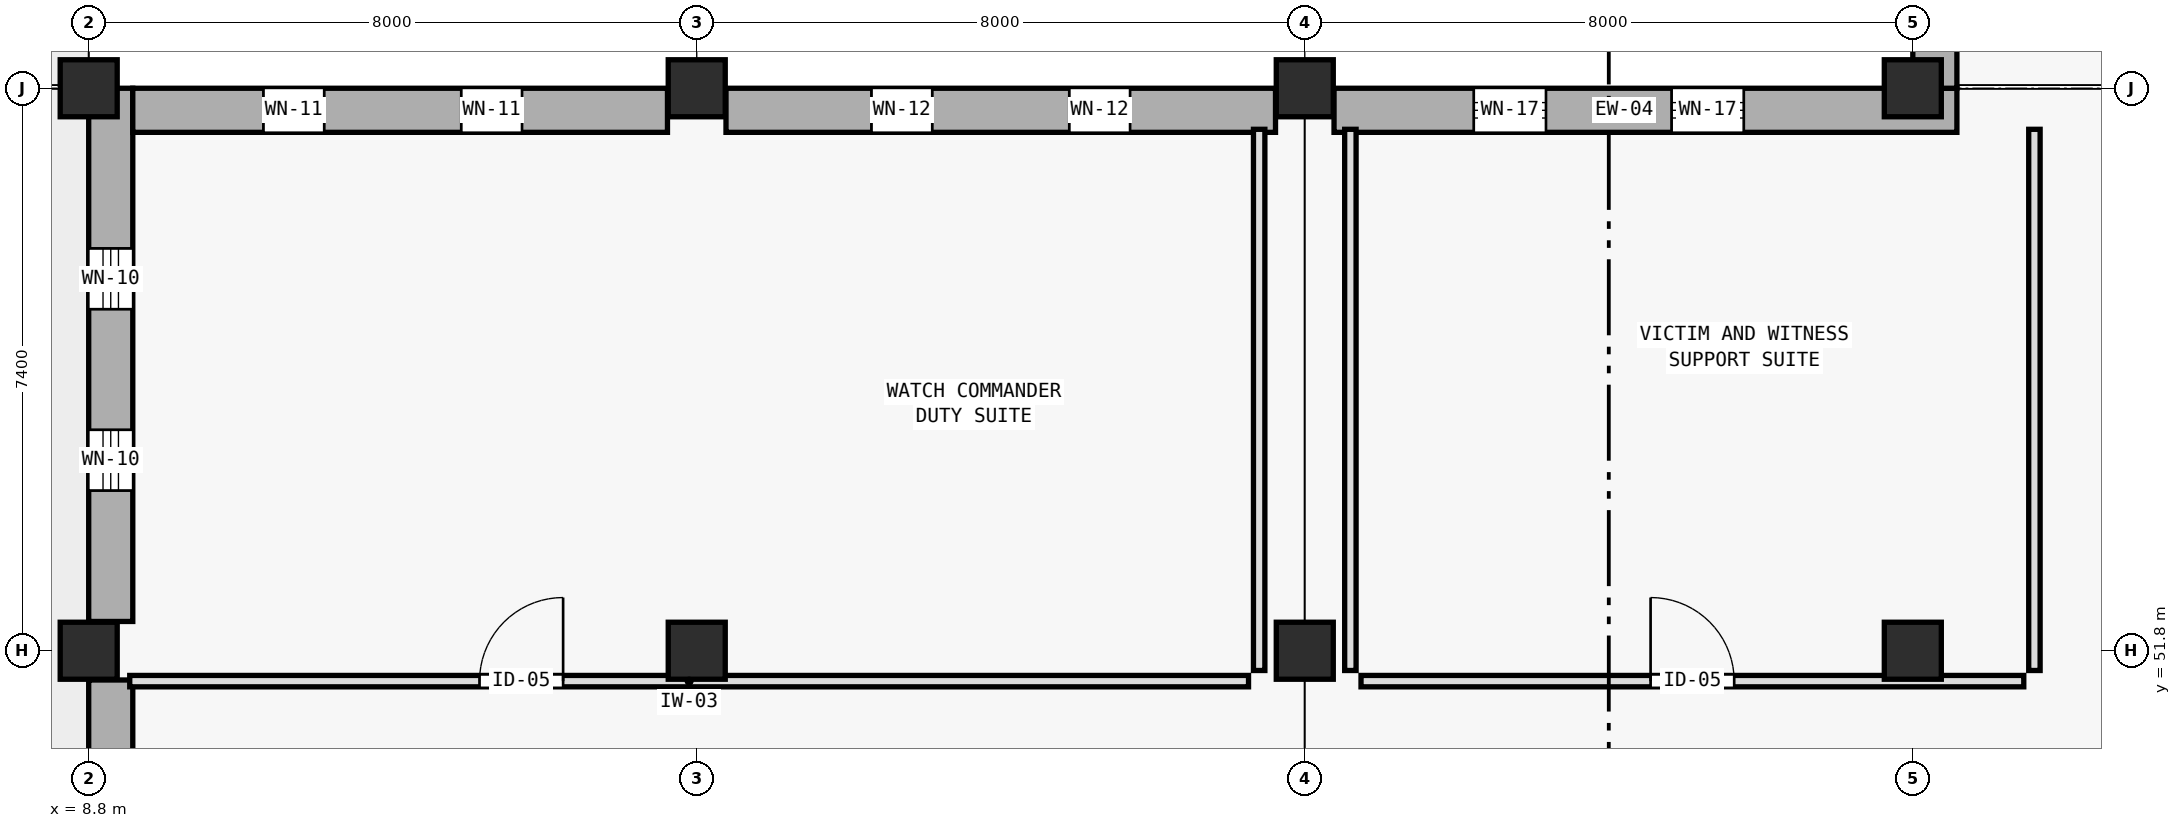
"""IFC4 building model, lengths in metres.
Left out: names, types, materials, properties, quantities, classifications, styles, units other than length and angle.
Written with IfcOpenShell. Run it as: python <this file> out.ifc"""

import sys

from ifc_helpers import new_model, si_unit, direction, frame, frame_2d, origin, origin_2d, place, context, subcontext, project, spatial, rectangle, extrude, element, fill, save


model = new_model("IFC4")
c1 = context("Model", 3, precision=1e-05, world=origin(), true_north=direction((0.0, 1.0)))
c2 = subcontext(c1, "Body", "Model", "MODEL_VIEW")
j1 = project(units=[si_unit("LENGTHUNIT", "METRE"), si_unit("PLANEANGLEUNIT", "RADIAN")], contexts=[c1])
p1 = place(None, origin())
s1 = spatial("IfcSite", under=j1, at=p1, CompositionType="ELEMENT")
p2 = place(p1, origin())
s2 = spatial("IfcBuilding", under=s1, at=p2, CompositionType="ELEMENT")
p3 = place(p2, origin())
s3 = spatial("IfcBuildingStorey", under=s2, at=p3, CompositionType="ELEMENT", Elevation=0.0)
for number, where, z_axis, x_axis in (
    (1, (8.8, 51.8, 0.0), (0.0, 0.0, 1.0), (1.0, 0.0, 0.0)),
    (2, (8.8, 59.2, 0.0), (0.0, 0.0, 1.0), (1.0, 0.0, 0.0)),
    (3, (16.8, 51.8, 0.0), (0.0, 0.0, 1.0), (1.0, 0.0, 0.0)),
    (4, (16.8, 59.2, 0.0), (0.0, 0.0, 1.0), (1.0, 0.0, 0.0)),
    (5, (24.8, 51.8, 0.0), (0.0, 0.0, 1.0), (1.0, 0.0, 0.0)),
    (6, (24.8, 59.2, 0.0), (0.0, 0.0, 1.0), (1.0, 0.0, 0.0)),
    (7, (32.8, 51.8, 0.0), (0.0, 0.0, 1.0), (1.0, 0.0, 0.0)),
    (8, (32.8, 59.2, 0.0), (0.0, 0.0, 1.0), (1.0, 0.0, 0.0)),
):
    element("IfcColumn", number, at=place(p3, frame(where, z_axis=z_axis, x_axis=x_axis)), inside=s3, PredefinedType="COLUMN", context=c2, shape_type="SweptSolid", body=[
        extrude(rectangle(XDim=0.75, YDim=0.75, at=origin_2d()), origin(), (0.0, 0.0, 1.0), 5.4),
    ])
p4 = place(p3, frame((9.09, 44.785, 0.0), z_axis=(0.0, 0.0, 1.0), x_axis=(0.0, 1.0, 0.0)))
e9 = element("IfcWall", 9, at=p4, inside=s3, PredefinedType="STANDARD", context=c2, shape_type="SweptSolid", body=[
    extrude(rectangle(XDim=6.63, YDim=0.58, at=frame_2d((3.315, 0.0))), origin(), (0.0, 0.0, 1.0), 5.14),
])
p5 = place(p4, frame((1.771, 0.0, 0.9)))
e10 = element("IfcOpeningElement", 10, at=p5, cuts=e9, PredefinedType="OPENING", context=c2, shape_type="SweptSolid", body=[
    extrude(rectangle(XDim=0.7, YDim=2.4, at=frame_2d((0.35, 1.2))), frame((0.0, 0.3, 0.0), z_axis=(0.0, -1.0, 0.0), x_axis=(1.0, 0.0, 0.0)), (0.0, 0.0, 1.0), 0.6),
])
p6 = place(p4, frame((4.158, 0.0, 0.9)))
e11 = element("IfcOpeningElement", 11, at=p6, cuts=e9, PredefinedType="OPENING", context=c2, shape_type="SweptSolid", body=[
    extrude(rectangle(XDim=0.7, YDim=2.4, at=frame_2d((0.35, 1.2))), frame((0.0, 0.3, 0.0), z_axis=(0.0, -1.0, 0.0), x_axis=(1.0, 0.0, 0.0)), (0.0, 0.0, 1.0), 0.6),
])
p7 = place(p3, frame((9.09, 52.185, 0.0), z_axis=(0.0, 0.0, 1.0), x_axis=(0.0, 1.0, 0.0)))
e12 = element("IfcWall", 12, at=p7, inside=s3, PredefinedType="STANDARD", context=c2, shape_type="SweptSolid", body=[
    extrude(rectangle(XDim=7.015, YDim=0.58, at=frame_2d((3.507, 0.0))), origin(), (0.0, 0.0, 1.0), 5.14),
])
p8 = place(p7, frame((1.722, 0.0, 1.35)))
e13 = element("IfcOpeningElement", 13, at=p8, cuts=e12, PredefinedType="OPENING", context=c2, shape_type="SweptSolid", body=[
    extrude(rectangle(XDim=0.8, YDim=1.55, at=frame_2d((0.4, 0.775))), frame((0.0, 0.3, 0.0), z_axis=(0.0, -1.0, 0.0), x_axis=(1.0, 0.0, 0.0)), (0.0, 0.0, 1.0), 0.6),
])
p9 = place(p7, frame((4.108, 0.0, 1.35)))
e14 = element("IfcOpeningElement", 14, at=p9, cuts=e12, PredefinedType="OPENING", context=c2, shape_type="SweptSolid", body=[
    extrude(rectangle(XDim=0.8, YDim=1.55, at=frame_2d((0.4, 0.775))), frame((0.0, 0.3, 0.0), z_axis=(0.0, -1.0, 0.0), x_axis=(1.0, 0.0, 0.0)), (0.0, 0.0, 1.0), 0.6),
])
p10 = place(p3, frame((9.38, 58.91, 0.0), z_axis=(0.0, 0.0, 1.0), x_axis=(1.0, 0.0, 0.0)))
e15 = element("IfcWall", 15, at=p10, inside=s3, PredefinedType="STANDARD", context=c2, shape_type="SweptSolid", body=[
    extrude(rectangle(XDim=7.035, YDim=0.58, at=frame_2d((3.518, 0.0))), origin(), (0.0, 0.0, 1.0), 5.14),
])
p11 = place(p10, frame((1.719, 0.0, 0.9)))
e16 = element("IfcOpeningElement", 16, at=p11, cuts=e15, PredefinedType="OPENING", context=c2, shape_type="SweptSolid", body=[
    extrude(rectangle(XDim=0.8, YDim=1.95, at=frame_2d((0.4, 0.975))), frame((0.0, 0.3, 0.0), z_axis=(0.0, -1.0, 0.0), x_axis=(1.0, 0.0, 0.0)), (0.0, 0.0, 1.0), 0.6),
])
p12 = place(p10, frame((4.321, 0.0, 0.9)))
e17 = element("IfcOpeningElement", 17, at=p12, cuts=e15, PredefinedType="OPENING", context=c2, shape_type="SweptSolid", body=[
    extrude(rectangle(XDim=0.8, YDim=1.95, at=frame_2d((0.4, 0.975))), frame((0.0, 0.3, 0.0), z_axis=(0.0, -1.0, 0.0), x_axis=(1.0, 0.0, 0.0)), (0.0, 0.0, 1.0), 0.6),
])
p13 = place(p3, frame((17.185, 58.91, 0.0), z_axis=(0.0, 0.0, 1.0), x_axis=(1.0, 0.0, 0.0)))
e18 = element("IfcWall", 18, at=p13, inside=s3, PredefinedType="STANDARD", context=c2, shape_type="SweptSolid", body=[
    extrude(rectangle(XDim=7.23, YDim=0.58, at=frame_2d((3.615, 0.0))), origin(), (0.0, 0.0, 1.0), 5.14),
])
p14 = place(p13, frame((1.914, 0.0, 0.9)))
e19 = element("IfcOpeningElement", 19, at=p14, cuts=e18, PredefinedType="OPENING", context=c2, shape_type="SweptSolid", body=[
    extrude(rectangle(XDim=0.8, YDim=2.35, at=frame_2d((0.4, 1.175))), frame((0.0, 0.3, 0.0), z_axis=(0.0, -1.0, 0.0), x_axis=(1.0, 0.0, 0.0)), (0.0, 0.0, 1.0), 0.6),
])
p15 = place(p13, frame((4.516, 0.0, 0.9)))
e20 = element("IfcOpeningElement", 20, at=p15, cuts=e18, PredefinedType="OPENING", context=c2, shape_type="SweptSolid", body=[
    extrude(rectangle(XDim=0.8, YDim=2.35, at=frame_2d((0.4, 1.175))), frame((0.0, 0.3, 0.0), z_axis=(0.0, -1.0, 0.0), x_axis=(1.0, 0.0, 0.0)), (0.0, 0.0, 1.0), 0.6),
])
p16 = place(p3, frame((25.185, 58.91, 0.0), z_axis=(0.0, 0.0, 1.0), x_axis=(1.0, 0.0, 0.0)))
e21 = element("IfcWall", 21, at=p16, inside=s3, PredefinedType="STANDARD", context=c2, shape_type="SweptSolid", body=[
    extrude(rectangle(XDim=8.195, YDim=0.58, at=frame_2d((4.097, 0.0))), origin(), (0.0, 0.0, 1.0), 5.14),
])
p17 = place(p16, frame((1.839, 0.0, 0.9)))
e22 = element("IfcOpeningElement", 22, at=p17, cuts=e21, PredefinedType="OPENING", context=c2, shape_type="SweptSolid", body=[
    extrude(rectangle(XDim=0.95, YDim=1.8, at=frame_2d((0.475, 0.9))), frame((0.0, 0.3, 0.0), z_axis=(0.0, -1.0, 0.0), x_axis=(1.0, 0.0, 0.0)), (0.0, 0.0, 1.0), 0.6),
])
p18 = place(p16, frame((4.441, 0.0, 0.9)))
e23 = element("IfcOpeningElement", 23, at=p18, cuts=e21, PredefinedType="OPENING", context=c2, shape_type="SweptSolid", body=[
    extrude(rectangle(XDim=0.95, YDim=1.8, at=frame_2d((0.475, 0.9))), frame((0.0, 0.3, 0.0), z_axis=(0.0, -1.0, 0.0), x_axis=(1.0, 0.0, 0.0)), (0.0, 0.0, 1.0), 0.6),
])
p19 = place(p3, frame((33.09, 59.2, 0.0), z_axis=(0.0, 0.0, 1.0), x_axis=(0.0, 1.0, 0.0)))
e24 = element("IfcWall", 24, at=p19, inside=s3, PredefinedType="STANDARD", context=c2, shape_type="SweptSolid", body=[
    extrude(rectangle(XDim=7.09, YDim=0.58, at=frame_2d((3.545, 0.0))), origin(), (0.0, 0.0, 1.0), 5.14),
])
p20 = place(p19, frame((2.056, 0.0, 0.9)))
e25 = element("IfcOpeningElement", 25, at=p20, cuts=e24, PredefinedType="OPENING", context=c2, shape_type="SweptSolid", body=[
    extrude(rectangle(XDim=0.95, YDim=2.2, at=frame_2d((0.475, 1.1))), frame((0.0, 0.3, 0.0), z_axis=(0.0, -1.0, 0.0), x_axis=(1.0, 0.0, 0.0)), (0.0, 0.0, 1.0), 0.6),
])
p21 = place(p19, frame((4.469, 0.0, 0.9)))
e26 = element("IfcOpeningElement", 26, at=p21, cuts=e24, PredefinedType="OPENING", context=c2, shape_type="SweptSolid", body=[
    extrude(rectangle(XDim=0.95, YDim=2.2, at=frame_2d((0.475, 1.1))), frame((0.0, 0.3, 0.0), z_axis=(0.0, -1.0, 0.0), x_axis=(1.0, 0.0, 0.0)), (0.0, 0.0, 1.0), 0.6),
])
p22 = place(p3, frame((9.34, 51.4, 0.0), z_axis=(0.0, 0.0, 1.0), x_axis=(1.0, 0.0, 0.0)))
e27 = element("IfcWall", 27, at=p22, inside=s3, PredefinedType="PARTITIONING", context=c2, shape_type="SweptSolid", body=[
    extrude(rectangle(XDim=14.72, YDim=0.15, at=frame_2d((7.36, 0.0))), origin(), (0.0, 0.0, 1.0), 4.27),
])
p23 = place(p22, frame((4.602, 0.0, 0.0)))
e28 = element("IfcOpeningElement", 28, at=p23, cuts=e27, PredefinedType="OPENING", context=c2, shape_type="SweptSolid", body=[
    extrude(rectangle(XDim=1.1, YDim=2.2, at=frame_2d((0.55, 1.1))), frame((0.0, 0.085, 0.0), z_axis=(0.0, -1.0, 0.0), x_axis=(1.0, 0.0, 0.0)), (0.0, 0.0, 1.0), 0.17),
])
p24 = place(p3, frame((24.2, 51.54, 0.0), z_axis=(0.0, 0.0, 1.0), x_axis=(0.0, 1.0, 0.0)))
e29 = element("IfcWall", 29, at=p24, inside=s3, PredefinedType="PARTITIONING", context=c2, shape_type="SweptSolid", body=[
    extrude(rectangle(XDim=7.12, YDim=0.15, at=frame_2d((3.56, 0.0))), origin(), (0.0, 0.0, 1.0), 4.27),
])
p25 = place(p3, frame((25.54, 51.4, 0.0), z_axis=(0.0, 0.0, 1.0), x_axis=(1.0, 0.0, 0.0)))
e30 = element("IfcWall", 30, at=p25, inside=s3, PredefinedType="PARTITIONING", context=c2, shape_type="SweptSolid", body=[
    extrude(rectangle(XDim=8.72, YDim=0.15, at=frame_2d((4.36, 0.0))), origin(), (0.0, 0.0, 1.0), 4.27),
])
p26 = place(p25, frame((3.81, 0.0, 0.0)))
e31 = element("IfcOpeningElement", 31, at=p26, cuts=e30, PredefinedType="OPENING", context=c2, shape_type="SweptSolid", body=[
    extrude(rectangle(XDim=1.1, YDim=2.2, at=frame_2d((0.55, 1.1))), frame((0.0, 0.085, 0.0), z_axis=(0.0, -1.0, 0.0), x_axis=(1.0, 0.0, 0.0)), (0.0, 0.0, 1.0), 0.17),
])
p27 = place(p3, frame((25.4, 51.54, 0.0), z_axis=(0.0, 0.0, 1.0), x_axis=(0.0, 1.0, 0.0)))
e32 = element("IfcWall", 32, at=p27, inside=s3, PredefinedType="PARTITIONING", context=c2, shape_type="SweptSolid", body=[
    extrude(rectangle(XDim=7.12, YDim=0.15, at=frame_2d((3.56, 0.0))), origin(), (0.0, 0.0, 1.0), 4.27),
])
p28 = place(p3, frame((34.4, 51.54, 0.0), z_axis=(0.0, 0.0, 1.0), x_axis=(0.0, 1.0, 0.0)))
e33 = element("IfcWall", 33, at=p28, inside=s3, PredefinedType="PARTITIONING", context=c2, shape_type="SweptSolid", body=[
    extrude(rectangle(XDim=7.12, YDim=0.15, at=frame_2d((3.56, 0.0))), origin(), (0.0, 0.0, 1.0), 5.14),
])
p29 = place(p8, origin())
e34 = element("IfcWindow", 34, at=p29, inside=s3, PartitioningType="SINGLE_PANEL", PredefinedType="WINDOW", context=c2, shape_type="SweptSolid", body=[
    extrude(rectangle(XDim=0.8, YDim=1.55, at=frame_2d((0.4, 0.775))), frame((0.0, 0.03, 0.0), z_axis=(0.0, -1.0, 0.0), x_axis=(1.0, 0.0, 0.0)), (0.0, 0.0, 1.0), 0.06),
])
fill(e13, e34)
p30 = place(p9, origin())
e35 = element("IfcWindow", 35, at=p30, inside=s3, PartitioningType="SINGLE_PANEL", PredefinedType="WINDOW", context=c2, shape_type="SweptSolid", body=[
    extrude(rectangle(XDim=0.8, YDim=1.55, at=frame_2d((0.4, 0.775))), frame((0.0, 0.03, 0.0), z_axis=(0.0, -1.0, 0.0), x_axis=(1.0, 0.0, 0.0)), (0.0, 0.0, 1.0), 0.06),
])
fill(e14, e35)
p31 = place(p11, origin())
e36 = element("IfcWindow", 36, at=p31, inside=s3, PartitioningType="SINGLE_PANEL", PredefinedType="WINDOW", context=c2, shape_type="SweptSolid", body=[
    extrude(rectangle(XDim=0.8, YDim=1.95, at=frame_2d((0.4, 0.975))), frame((0.0, 0.03, 0.0), z_axis=(0.0, -1.0, 0.0), x_axis=(1.0, 0.0, 0.0)), (0.0, 0.0, 1.0), 0.06),
])
fill(e16, e36)
p32 = place(p12, origin())
e37 = element("IfcWindow", 37, at=p32, inside=s3, PartitioningType="SINGLE_PANEL", PredefinedType="WINDOW", context=c2, shape_type="SweptSolid", body=[
    extrude(rectangle(XDim=0.8, YDim=1.95, at=frame_2d((0.4, 0.975))), frame((0.0, 0.03, 0.0), z_axis=(0.0, -1.0, 0.0), x_axis=(1.0, 0.0, 0.0)), (0.0, 0.0, 1.0), 0.06),
])
fill(e17, e37)
p33 = place(p14, origin())
e38 = element("IfcWindow", 38, at=p33, inside=s3, PartitioningType="SINGLE_PANEL", PredefinedType="WINDOW", context=c2, shape_type="SweptSolid", body=[
    extrude(rectangle(XDim=0.8, YDim=2.35, at=frame_2d((0.4, 1.175))), frame((0.0, 0.03, 0.0), z_axis=(0.0, -1.0, 0.0), x_axis=(1.0, 0.0, 0.0)), (0.0, 0.0, 1.0), 0.06),
])
fill(e19, e38)
p34 = place(p15, origin())
e39 = element("IfcWindow", 39, at=p34, inside=s3, PartitioningType="SINGLE_PANEL", PredefinedType="WINDOW", context=c2, shape_type="SweptSolid", body=[
    extrude(rectangle(XDim=0.8, YDim=2.35, at=frame_2d((0.4, 1.175))), frame((0.0, 0.03, 0.0), z_axis=(0.0, -1.0, 0.0), x_axis=(1.0, 0.0, 0.0)), (0.0, 0.0, 1.0), 0.06),
])
fill(e20, e39)
p35 = place(p17, origin())
e40 = element("IfcWindow", 40, at=p35, inside=s3, PartitioningType="SINGLE_PANEL", PredefinedType="WINDOW", context=c2, shape_type="SweptSolid", body=[
    extrude(rectangle(XDim=0.95, YDim=1.8, at=frame_2d((0.475, 0.9))), frame((0.0, 0.03, 0.0), z_axis=(0.0, -1.0, 0.0), x_axis=(1.0, 0.0, 0.0)), (0.0, 0.0, 1.0), 0.06),
])
fill(e22, e40)
p36 = place(p18, origin())
e41 = element("IfcWindow", 41, at=p36, inside=s3, PartitioningType="SINGLE_PANEL", PredefinedType="WINDOW", context=c2, shape_type="SweptSolid", body=[
    extrude(rectangle(XDim=0.95, YDim=1.8, at=frame_2d((0.475, 0.9))), frame((0.0, 0.03, 0.0), z_axis=(0.0, -1.0, 0.0), x_axis=(1.0, 0.0, 0.0)), (0.0, 0.0, 1.0), 0.06),
])
fill(e23, e41)
p37 = place(p23, origin())
e42 = element("IfcDoor", 42, at=p37, inside=s3, OperationType="SINGLE_SWING_RIGHT", PredefinedType="DOOR", context=c2, shape_type="SweptSolid", body=[
    extrude(rectangle(XDim=1.1, YDim=2.2, at=frame_2d((0.55, 1.1))), frame((0.0, 0.025, 0.0), z_axis=(0.0, -1.0, 0.0), x_axis=(1.0, 0.0, 0.0)), (0.0, 0.0, 1.0), 0.05),
])
fill(e28, e42)
p38 = place(p26, origin())
e43 = element("IfcDoor", 43, at=p38, inside=s3, OperationType="SINGLE_SWING_LEFT", PredefinedType="DOOR", context=c2, shape_type="SweptSolid", body=[
    extrude(rectangle(XDim=1.1, YDim=2.2, at=frame_2d((0.55, 1.1))), frame((0.0, 0.025, 0.0), z_axis=(0.0, -1.0, 0.0), x_axis=(1.0, 0.0, 0.0)), (0.0, 0.0, 1.0), 0.05),
])
fill(e31, e43)
save(model, sys.argv[1])
